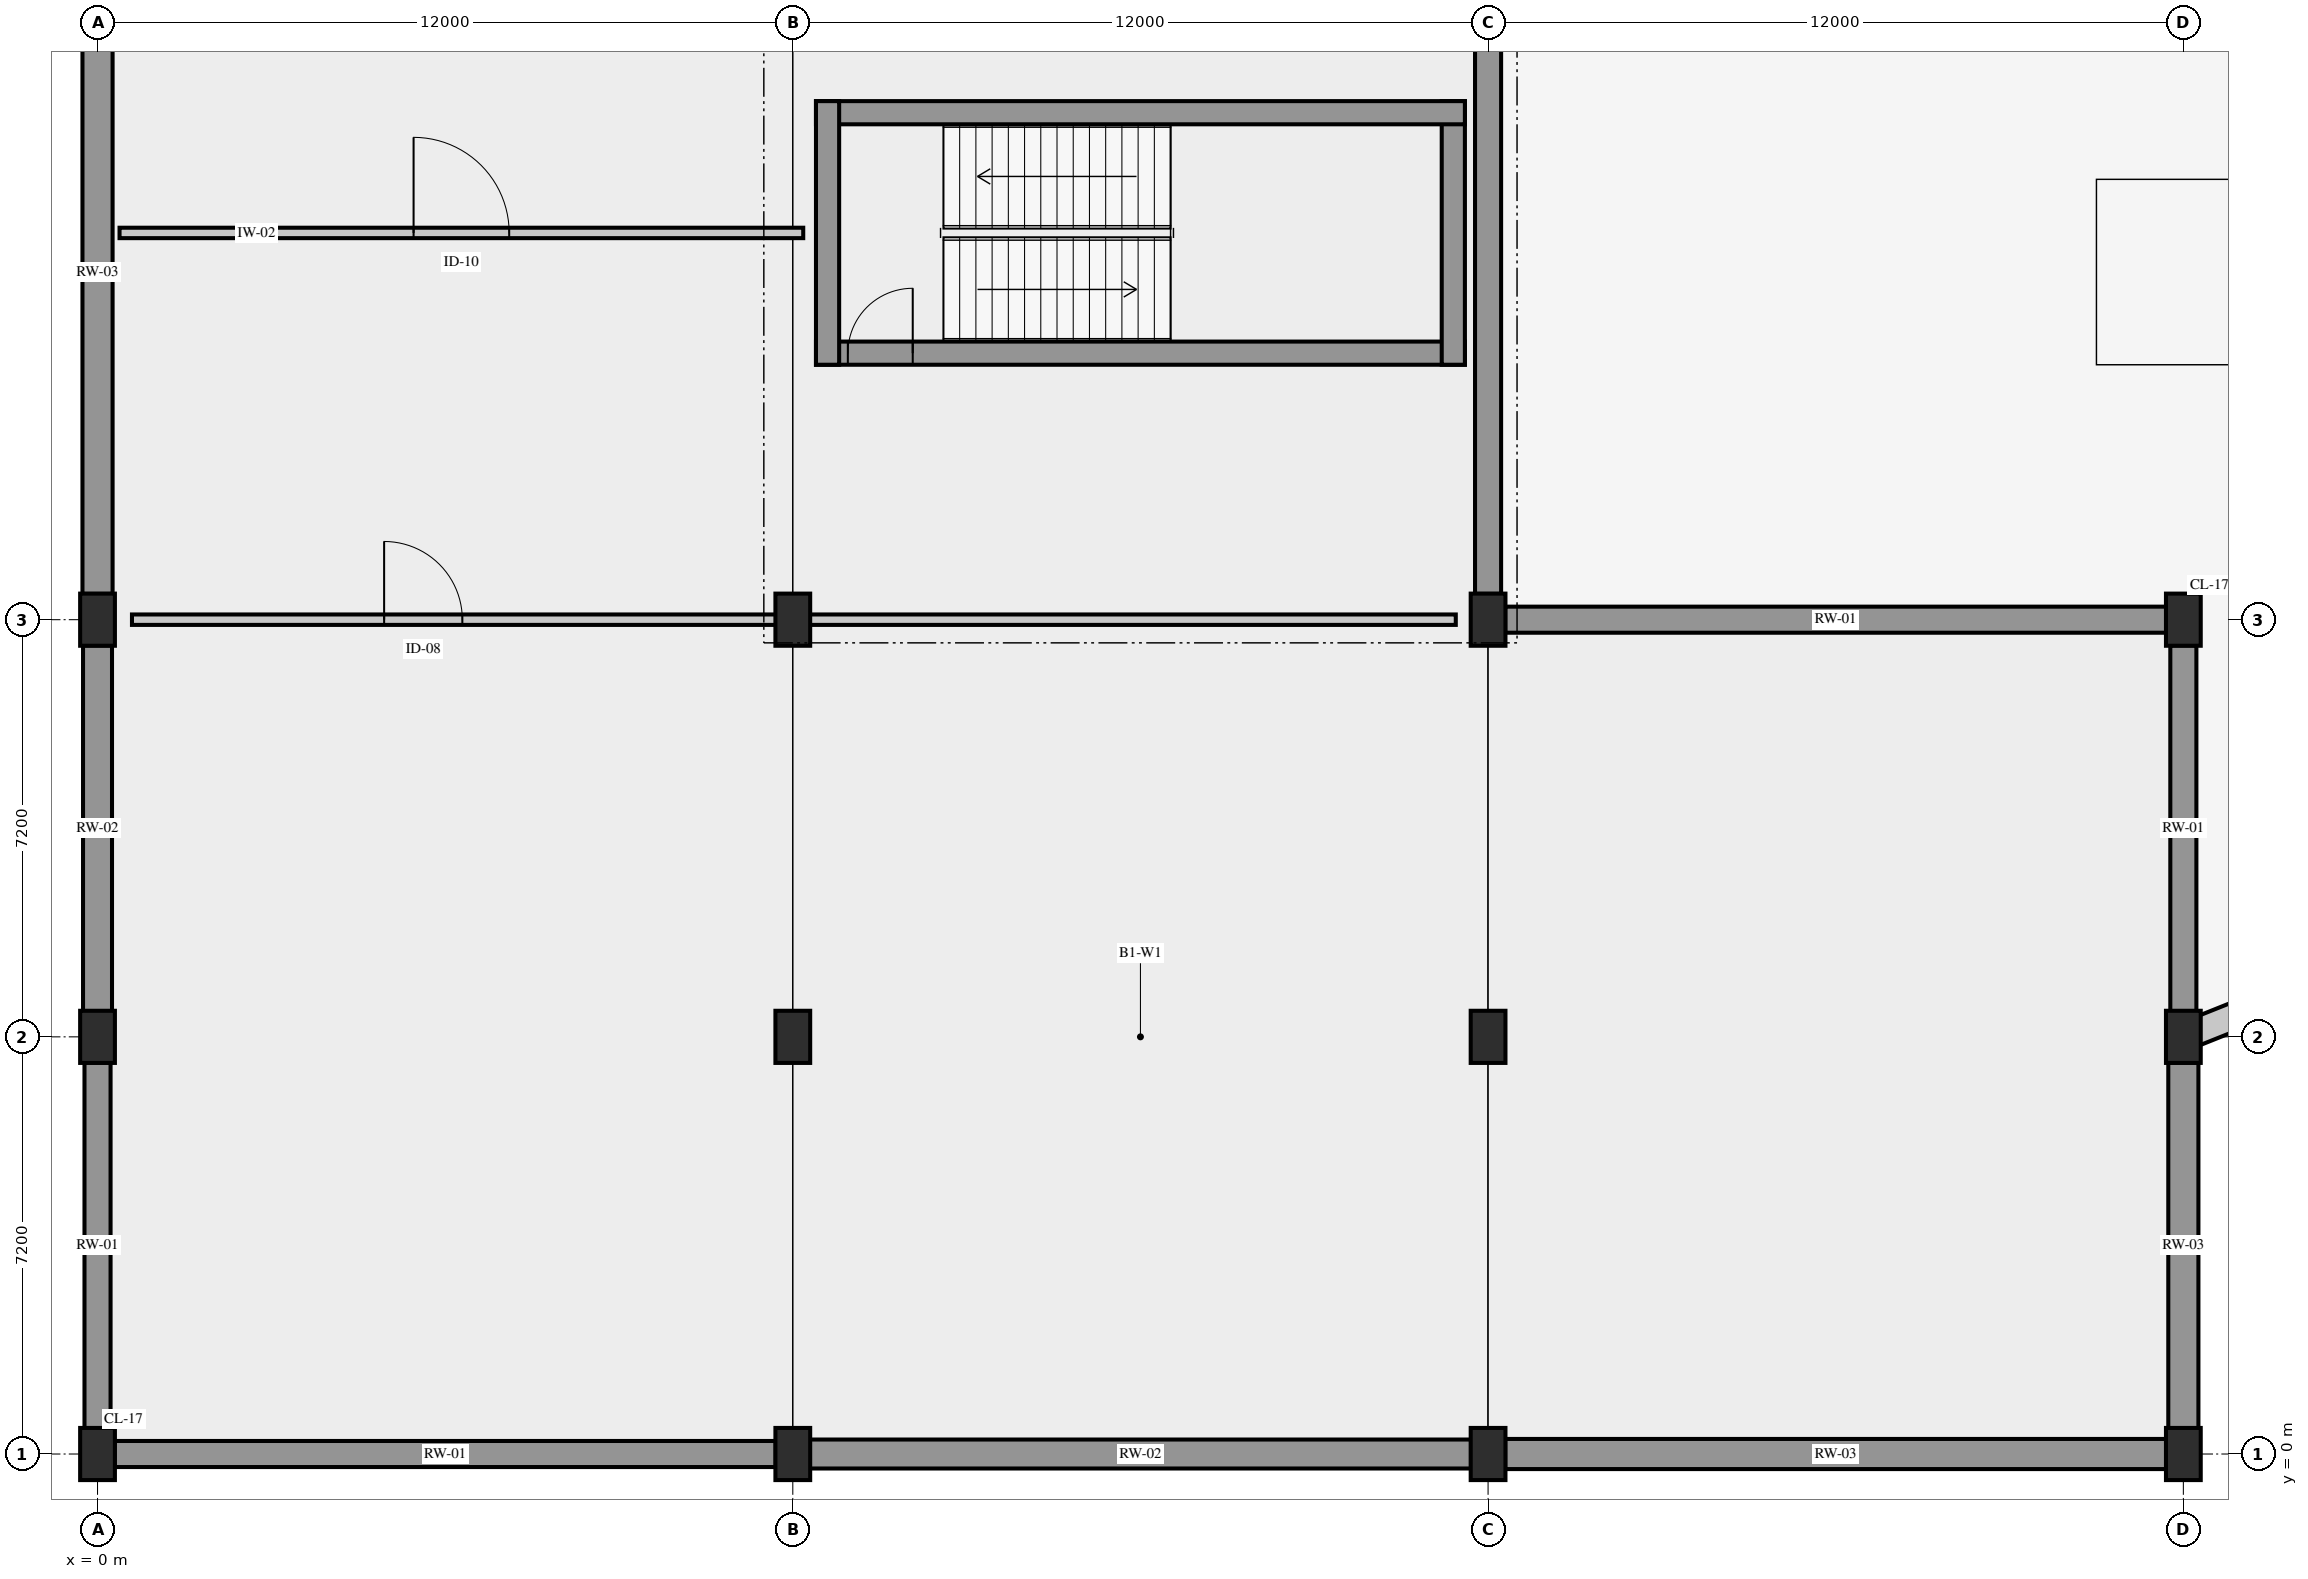
"""IFC4 building model, lengths in metres.
Left out: names, types, materials, properties, quantities, classifications, styles, units other than length and angle.
Written with IfcOpenShell. Run it as: python <this file> out.ifc"""

import sys

from ifc_helpers import new_model, si_unit, direction, frame, frame_2d, origin, origin_2d, place, context, subcontext, project, spatial, rectangle, extrude, element, fill, save


model = new_model("IFC4")
c1 = context("Model", 3, precision=1e-05, world=origin(), true_north=direction((0.0, 1.0)))
c2 = subcontext(c1, "Body", "Model", "MODEL_VIEW")
j1 = project(units=[si_unit("LENGTHUNIT", "METRE"), si_unit("PLANEANGLEUNIT", "RADIAN")], contexts=[c1])
p1 = place(None, origin())
s1 = spatial("IfcSite", under=j1, at=p1, CompositionType="ELEMENT")
p2 = place(p1, origin())
s2 = spatial("IfcBuilding", under=s1, at=p2, CompositionType="ELEMENT")
p3 = place(p2, frame((0.0, 0.0, -5.4)))
s3 = spatial("IfcBuildingStorey", under=s2, at=p3, CompositionType="ELEMENT", Elevation=-5.4)
for number, where, z_axis, x_axis in (
    (1, (0.0, 0.0, 0.0), (0.0, 0.0, 1.0), (1.0, 0.0, 0.0)),
    (2, (0.0, 7.2, 0.0), (0.0, 0.0, 1.0), (1.0, 0.0, 0.0)),
    (3, (0.0, 14.4, 0.0), (0.0, 0.0, 1.0), (1.0, 0.0, 0.0)),
    (4, (12.0, 0.0, 0.0), (0.0, 0.0, 1.0), (1.0, 0.0, 0.0)),
    (5, (12.0, 7.2, 0.0), (0.0, 0.0, 1.0), (1.0, 0.0, 0.0)),
    (6, (12.0, 14.4, 0.0), (0.0, 0.0, 1.0), (1.0, 0.0, 0.0)),
    (7, (24.0, 0.0, 0.0), (0.0, 0.0, 1.0), (1.0, 0.0, 0.0)),
    (8, (24.0, 7.2, 0.0), (0.0, 0.0, 1.0), (1.0, 0.0, 0.0)),
    (9, (24.0, 14.4, 0.0), (0.0, 0.0, 1.0), (1.0, 0.0, 0.0)),
    (10, (36.0, 0.0, 0.0), (0.0, 0.0, 1.0), (1.0, 0.0, 0.0)),
    (11, (36.0, 7.2, 0.0), (0.0, 0.0, 1.0), (1.0, 0.0, 0.0)),
    (12, (36.0, 14.4, 0.0), (0.0, 0.0, 1.0), (1.0, 0.0, 0.0)),
):
    element("IfcColumn", number, at=place(p3, frame(where, z_axis=z_axis, x_axis=x_axis)), inside=s3, PredefinedType="COLUMN", context=c2, shape_type="SweptSolid", body=[
        extrude(rectangle(XDim=0.6, YDim=0.9, at=origin_2d()), origin(), (0.0, 0.0, 1.0), 5.4),
    ])
p4 = place(p3, frame((36.0, 7.2, -1.3), z_axis=(0.0, 0.0, 1.0), x_axis=(0.92847572057, 0.371393102132, 0.0)))
e13 = element("IfcWall", 13, at=p4, inside=s3, PredefinedType="SOLIDWALL", context=c2, shape_type="SweptSolid", body=[
    extrude(rectangle(XDim=17.353, YDim=0.48, at=frame_2d((8.676, 0.0))), origin(), (0.0, 0.0, 1.0), 2.95),
])
p5 = place(p3, frame((0.295, 0.0, 0.0), z_axis=(0.0, 0.0, 1.0), x_axis=(1.0, 0.0, 0.0)))
e14 = element("IfcWall", 14, at=p5, inside=s3, PredefinedType="USERDEFINED", context=c2, shape_type="SweptSolid", body=[
    extrude(rectangle(XDim=11.41, YDim=0.45, at=frame_2d((5.705, 0.0))), origin(), (0.0, 0.0, 1.0), 4.54),
])
p6 = place(p3, frame((0.0, 6.755, 0.0), z_axis=(0.0, 0.0, 1.0), x_axis=(0.0, -1.0, 0.0)))
e15 = element("IfcWall", 15, at=p6, inside=s3, PredefinedType="USERDEFINED", context=c2, shape_type="SweptSolid", body=[
    extrude(rectangle(XDim=6.31, YDim=0.45, at=frame_2d((3.155, 0.0))), origin(), (0.0, 0.0, 1.0), 4.54),
])
p7 = place(p3, frame((0.0, 13.955, 0.0), z_axis=(0.0, 0.0, 1.0), x_axis=(0.0, -1.0, 0.0)))
e16 = element("IfcWall", 16, at=p7, inside=s3, PredefinedType="USERDEFINED", context=c2, shape_type="SweptSolid", body=[
    extrude(rectangle(XDim=6.31, YDim=0.5, at=frame_2d((3.155, 0.0))), origin(), (0.0, 0.0, 1.0), 4.54),
])
p8 = place(p3, frame((0.0, 25.955, 0.0), z_axis=(0.0, 0.0, 1.0), x_axis=(0.0, -1.0, 0.0)))
e17 = element("IfcWall", 17, at=p8, inside=s3, PredefinedType="USERDEFINED", context=c2, shape_type="SweptSolid", body=[
    extrude(rectangle(XDim=11.11, YDim=0.52, at=frame_2d((5.555, 0.0))), origin(), (0.0, 0.0, 1.0), 4.54),
])
p9 = place(p3, frame((12.295, 0.0, 0.0), z_axis=(0.0, 0.0, 1.0), x_axis=(1.0, 0.0, 0.0)))
e18 = element("IfcWall", 18, at=p9, inside=s3, PredefinedType="USERDEFINED", context=c2, shape_type="SweptSolid", body=[
    extrude(rectangle(XDim=11.41, YDim=0.5, at=frame_2d((5.705, 0.0))), origin(), (0.0, 0.0, 1.0), 4.54),
])
p10 = place(p3, frame((24.0, 14.845, 0.0), z_axis=(0.0, 0.0, 1.0), x_axis=(0.0, 1.0, 0.0)))
e19 = element("IfcWall", 19, at=p10, inside=s3, PredefinedType="USERDEFINED", context=c2, shape_type="SweptSolid", body=[
    extrude(rectangle(XDim=11.11, YDim=0.45, at=frame_2d((5.555, 0.0))), origin(), (0.0, 0.0, 1.0), 4.54),
])
p11 = place(p3, frame((24.295, 0.0, 0.0), z_axis=(0.0, 0.0, 1.0), x_axis=(1.0, 0.0, 0.0)))
e20 = element("IfcWall", 20, at=p11, inside=s3, PredefinedType="USERDEFINED", context=c2, shape_type="SweptSolid", body=[
    extrude(rectangle(XDim=11.41, YDim=0.52, at=frame_2d((5.705, 0.0))), origin(), (0.0, 0.0, 1.0), 4.54),
])
p12 = place(p3, frame((36.0, 0.445, 0.0), z_axis=(0.0, 0.0, 1.0), x_axis=(0.0, 1.0, 0.0)))
e21 = element("IfcWall", 21, at=p12, inside=s3, PredefinedType="USERDEFINED", context=c2, shape_type="SweptSolid", body=[
    extrude(rectangle(XDim=6.31, YDim=0.52, at=frame_2d((3.155, 0.0))), origin(), (0.0, 0.0, 1.0), 4.54),
])
p13 = place(p3, frame((35.705, 14.4, 0.0), z_axis=(0.0, 0.0, 1.0), x_axis=(-1.0, 0.0, 0.0)))
e22 = element("IfcWall", 22, at=p13, inside=s3, PredefinedType="USERDEFINED", context=c2, shape_type="SweptSolid", body=[
    extrude(rectangle(XDim=11.41, YDim=0.45, at=frame_2d((5.705, 0.0))), origin(), (0.0, 0.0, 1.0), 4.54),
])
p14 = place(p3, frame((36.0, 7.645, 0.0), z_axis=(0.0, 0.0, 1.0), x_axis=(0.0, 1.0, 0.0)))
e23 = element("IfcWall", 23, at=p14, inside=s3, PredefinedType="USERDEFINED", context=c2, shape_type="SweptSolid", body=[
    extrude(rectangle(XDim=6.31, YDim=0.45, at=frame_2d((3.155, 0.0))), origin(), (0.0, 0.0, 1.0), 4.54),
])
p15 = place(p3, frame((12.4, 19.0, 0.0), z_axis=(0.0, 0.0, 1.0), x_axis=(1.0, 0.0, 0.0)))
e24 = element("IfcWall", 24, at=p15, inside=s3, PredefinedType="SHEAR", context=c2, shape_type="SweptSolid", body=[
    extrude(rectangle(XDim=11.2, YDim=0.4, at=frame_2d((5.6, 0.0))), origin(), (0.0, 0.0, 1.0), 5.12),
])
p16 = place(p15, frame((0.55, 0.0, 0.0)))
e25 = element("IfcOpeningElement", 25, at=p16, cuts=e24, PredefinedType="OPENING", context=c2, shape_type="SweptSolid", body=[
    extrude(rectangle(XDim=1.12, YDim=2.2, at=frame_2d((0.56, 1.1))), frame((0.0, 0.21, 0.0), z_axis=(0.0, -1.0, 0.0), x_axis=(1.0, 0.0, 0.0)), (0.0, 0.0, 1.0), 0.42),
])
p17 = place(p3, frame((23.4, 18.8, 0.0), z_axis=(0.0, 0.0, 1.0), x_axis=(0.0, 1.0, 0.0)))
e26 = element("IfcWall", 26, at=p17, inside=s3, PredefinedType="SHEAR", context=c2, shape_type="SweptSolid", body=[
    extrude(rectangle(XDim=4.55, YDim=0.4, at=frame_2d((2.275, 0.0))), origin(), (0.0, 0.0, 1.0), 5.12),
])
p18 = place(p3, frame((23.6, 23.15, 0.0), z_axis=(0.0, 0.0, 1.0), x_axis=(-1.0, 0.0, 0.0)))
e27 = element("IfcWall", 27, at=p18, inside=s3, PredefinedType="SHEAR", context=c2, shape_type="SweptSolid", body=[
    extrude(rectangle(XDim=11.2, YDim=0.4, at=frame_2d((5.6, 0.0))), origin(), (0.0, 0.0, 1.0), 5.12),
])
p19 = place(p3, frame((12.6, 23.35, 0.0), z_axis=(0.0, 0.0, 1.0), x_axis=(0.0, -1.0, 0.0)))
e28 = element("IfcWall", 28, at=p19, inside=s3, PredefinedType="SHEAR", context=c2, shape_type="SweptSolid", body=[
    extrude(rectangle(XDim=4.55, YDim=0.4, at=frame_2d((2.275, 0.0))), origin(), (0.0, 0.0, 1.0), 5.12),
])
p20 = place(p3, frame((0.594, 14.4, 0.0), z_axis=(0.0, 0.0, 1.0), x_axis=(1.0, 0.0, 0.0)))
e29 = element("IfcWall", 29, at=p20, inside=s3, PredefinedType="PARTITIONING", context=c2, shape_type="SweptSolid", body=[
    extrude(rectangle(XDim=22.848, YDim=0.18, at=frame_2d((11.424, 0.0))), origin(), (0.0, 0.0, 1.0), 4.5),
])
p21 = place(p20, frame((4.352, 0.0, 0.0)))
e30 = element("IfcOpeningElement", 30, at=p21, cuts=e29, PredefinedType="OPENING", context=c2, shape_type="SweptSolid", body=[
    extrude(rectangle(XDim=1.35, YDim=2.3, at=frame_2d((0.675, 1.15))), frame((0.0, 0.1, 0.0), z_axis=(0.0, -1.0, 0.0), x_axis=(1.0, 0.0, 0.0)), (0.0, 0.0, 1.0), 0.2),
])
p22 = place(p3, frame((0.38, 21.075, 0.0), z_axis=(0.0, 0.0, 1.0), x_axis=(1.0, 0.0, 0.0)))
e31 = element("IfcWall", 31, at=p22, inside=s3, PredefinedType="PARTITIONING", context=c2, shape_type="SweptSolid", body=[
    extrude(rectangle(XDim=11.8, YDim=0.18, at=frame_2d((5.9, 0.0))), origin(), (0.0, 0.0, 1.0), 4.61),
])
p23 = place(p22, frame((5.075, 0.0, 0.0)))
e32 = element("IfcOpeningElement", 32, at=p23, cuts=e31, PredefinedType="OPENING", context=c2, shape_type="SweptSolid", body=[
    extrude(rectangle(XDim=1.65, YDim=2.35, at=frame_2d((0.825, 1.175))), frame((0.0, 0.1, 0.0), z_axis=(0.0, -1.0, 0.0), x_axis=(1.0, 0.0, 0.0)), (0.0, 0.0, 1.0), 0.2),
])
p24 = place(p16, origin())
e33 = element("IfcDoor", 33, at=p24, inside=s3, OperationType="SINGLE_SWING_RIGHT", PredefinedType="DOOR", context=c2, shape_type="SweptSolid", body=[
    extrude(rectangle(XDim=1.12, YDim=2.2, at=frame_2d((0.56, 1.1))), frame((0.0, 0.025, 0.0), z_axis=(0.0, -1.0, 0.0), x_axis=(1.0, 0.0, 0.0)), (0.0, 0.0, 1.0), 0.05),
])
fill(e25, e33)
p25 = place(p21, origin())
e34 = element("IfcDoor", 34, at=p25, inside=s3, OperationType="DOUBLE_SWING_LEFT", PredefinedType="DOOR", context=c2, shape_type="SweptSolid", body=[
    extrude(rectangle(XDim=1.35, YDim=2.3, at=frame_2d((0.675, 1.15))), frame((0.0, 0.025, 0.0), z_axis=(0.0, -1.0, 0.0), x_axis=(1.0, 0.0, 0.0)), (0.0, 0.0, 1.0), 0.05),
])
fill(e30, e34)
p26 = place(p23, origin())
e35 = element("IfcDoor", 35, at=p26, inside=s3, OperationType="DOUBLE_DOOR_SINGLE_SWING", PredefinedType="DOOR", context=c2, shape_type="SweptSolid", body=[
    extrude(rectangle(XDim=1.65, YDim=2.35, at=frame_2d((0.825, 1.175))), frame((0.0, 0.025, 0.0), z_axis=(0.0, -1.0, 0.0), x_axis=(1.0, 0.0, 0.0)), (0.0, 0.0, 1.0), 0.05),
])
fill(e32, e35)
save(model, sys.argv[1])
